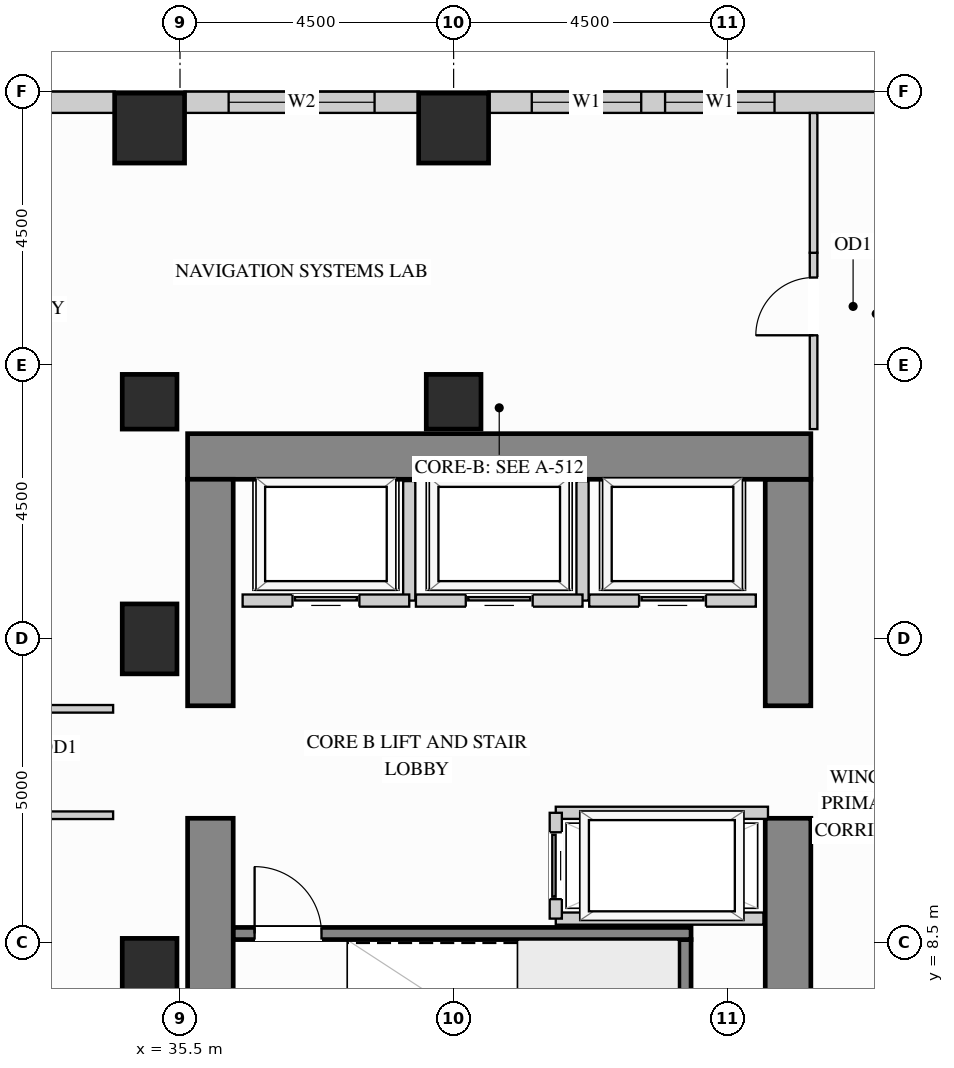
"""IFC4 building model, lengths in metres.
Left out: names, types, materials, properties, quantities, classifications, styles, units other than length and angle.
Written with IfcOpenShell. Run it as: python <this file> out.ifc"""

import sys

from ifc_helpers import new_model, si_unit, direction, frame, frame_2d, origin, origin_2d, place, context, subcontext, project, spatial, rectangle, extrude, source, transform, mapped, element, fill, save


model = new_model("IFC4")
c1 = context("Model", 3, precision=1e-05, world=origin(), true_north=direction((0.0, 1.0)))
c2 = subcontext(c1, "Body", "Model", "MODEL_VIEW")
j1 = project(units=[si_unit("LENGTHUNIT", "METRE"), si_unit("PLANEANGLEUNIT", "RADIAN")], contexts=[c1])
p1 = place(None, origin())
s1 = spatial("IfcSite", under=j1, at=p1, CompositionType="ELEMENT")
p2 = place(p1, origin())
s2 = spatial("IfcBuilding", under=s1, at=p2, CompositionType="ELEMENT")
p3 = place(p2, frame((0.0, 0.0, 77.4)))
s3 = spatial("IfcBuildingStorey", under=s2, at=p3, CompositionType="ELEMENT", Elevation=77.4)
m1 = source(origin(), c2, "Body", "SweptSolid", [
    extrude(rectangle(XDim=0.9, YDim=0.9, at=origin_2d()), origin(), (0.0, 0.0, 1.0), 3.38),
])
for number, where, z_axis, x_axis in (
    (1, (35.0, 17.4, 0.0), (0.0, 0.0, 1.0), (1.0, 0.0, 0.0)),
    (2, (40.0, 17.4, 0.0), (0.0, 0.0, 1.0), (1.0, 0.0, 0.0)),
):
    element("IfcColumn", number, at=place(p3, frame(where, z_axis=z_axis, x_axis=x_axis)), inside=s3, PredefinedType="COLUMN", context=c2, shape_type="MappedRepresentation", body=[
        mapped(m1, transform((0.0, 0.0, 0.0), x_axis=(1.0, 0.0, 0.0), y_axis=(0.0, 1.0, 0.0), z_axis=(0.0, 0.0, 1.0))),
    ])
m2 = source(origin(), c2, "Body", "SweptSolid", [
    extrude(rectangle(XDim=0.9, YDim=1.15, at=origin_2d()), origin(), (0.0, 0.0, 1.0), 3.38),
])
for number, where, z_axis, x_axis in (
    (3, (35.0, 13.5, 0.0), (0.0, 0.0, 1.0), (1.0, 0.0, 0.0)),
    (4, (35.0, 8.0, 0.0), (0.0, 0.0, 1.0), (1.0, 0.0, 0.0)),
):
    element("IfcColumn", number, at=place(p3, frame(where, z_axis=z_axis, x_axis=x_axis)), inside=s3, PredefinedType="COLUMN", context=c2, shape_type="MappedRepresentation", body=[
        mapped(m2, transform((0.0, 0.0, 0.0), x_axis=(1.0, 0.0, 0.0), y_axis=(0.0, 1.0, 0.0), z_axis=(0.0, 0.0, 1.0))),
    ])
m3 = source(origin(), c2, "Body", "SweptSolid", [
    extrude(rectangle(XDim=1.15, YDim=1.15, at=origin_2d()), origin(), (0.0, 0.0, 1.0), 3.38),
])
for number, where, z_axis, x_axis in (
    (5, (35.0, 21.9, 0.0), (0.0, 0.0, 1.0), (1.0, 0.0, 0.0)),
    (6, (40.0, 21.9, 0.0), (0.0, 0.0, 1.0), (1.0, 0.0, 0.0)),
):
    element("IfcColumn", number, at=place(p3, frame(where, z_axis=z_axis, x_axis=x_axis)), inside=s3, PredefinedType="COLUMN", context=c2, shape_type="MappedRepresentation", body=[
        mapped(m3, transform((0.0, 0.0, 0.0), x_axis=(1.0, 0.0, 0.0), y_axis=(0.0, 1.0, 0.0), z_axis=(0.0, 0.0, 1.0))),
    ])
m4 = source(origin(), c2, "Body", "SweptSolid", [
    extrude(rectangle(XDim=5.675, YDim=0.75, at=frame_2d((2.837, 0.0))), origin(), (0.0, 0.0, 1.0), 3.38),
])
p4 = place(p3, frame((45.5, 4.875, 0.0), z_axis=(0.0, 0.0, 1.0), x_axis=(0.0, 1.0, 0.0)))
e7 = element("IfcWall", 7, at=p4, inside=s3, PredefinedType="SHEAR", context=c2, shape_type="MappedRepresentation", body=[
    mapped(m4, transform((0.0, 0.0, 0.0), x_axis=(1.0, 0.0, 0.0), y_axis=(0.0, 1.0, 0.0), z_axis=(0.0, 0.0, 1.0))),
])
m5 = source(origin(), c2, "Body", "SweptSolid", [
    extrude(rectangle(XDim=3.725, YDim=0.75, at=frame_2d((1.863, 0.0))), origin(), (0.0, 0.0, 1.0), 3.38),
])
p5 = place(p3, frame((45.5, 12.4, 0.0), z_axis=(0.0, 0.0, 1.0), x_axis=(0.0, 1.0, 0.0)))
e8 = element("IfcWall", 8, at=p5, inside=s3, PredefinedType="SHEAR", context=c2, shape_type="MappedRepresentation", body=[
    mapped(m5, transform((0.0, 0.0, 0.0), x_axis=(1.0, 0.0, 0.0), y_axis=(0.0, 1.0, 0.0), z_axis=(0.0, 0.0, 1.0))),
])
m6 = source(origin(), c2, "Body", "SweptSolid", [
    extrude(rectangle(XDim=10.25, YDim=0.75, at=frame_2d((5.125, 0.0))), origin(), (0.0, 0.0, 1.0), 3.38),
])
p6 = place(p3, frame((35.625, 16.5, 0.0), z_axis=(0.0, 0.0, 1.0), x_axis=(1.0, 0.0, 0.0)))
e9 = element("IfcWall", 9, at=p6, inside=s3, PredefinedType="SHEAR", context=c2, shape_type="MappedRepresentation", body=[
    mapped(m6, transform((0.0, 0.0, 0.0), x_axis=(1.0, 0.0, 0.0), y_axis=(0.0, 1.0, 0.0), z_axis=(0.0, 0.0, 1.0))),
])
p7 = place(p3, frame((36.0, 4.875, 0.0), z_axis=(0.0, 0.0, 1.0), x_axis=(0.0, 1.0, 0.0)))
e10 = element("IfcWall", 10, at=p7, inside=s3, PredefinedType="SHEAR", context=c2, shape_type="MappedRepresentation", body=[
    mapped(m4, transform((0.0, 0.0, 0.0), x_axis=(1.0, 0.0, 0.0), y_axis=(0.0, 1.0, 0.0), z_axis=(0.0, 0.0, 1.0))),
])
p8 = place(p3, frame((36.0, 12.4, 0.0), z_axis=(0.0, 0.0, 1.0), x_axis=(0.0, 1.0, 0.0)))
e11 = element("IfcWall", 11, at=p8, inside=s3, PredefinedType="SHEAR", context=c2, shape_type="MappedRepresentation", body=[
    mapped(m5, transform((0.0, 0.0, 0.0), x_axis=(1.0, 0.0, 0.0), y_axis=(0.0, 1.0, 0.0), z_axis=(0.0, 0.0, 1.0))),
])
p9 = place(p3, frame((47.027, 22.325, 0.0), z_axis=(0.0, 0.0, 1.0), x_axis=(-1.0, 0.0, 0.0)))
e12 = element("IfcWall", 12, at=p9, inside=s3, PredefinedType="SOLIDWALL", context=c2, shape_type="SweptSolid", body=[
    extrude(rectangle(XDim=6.454, YDim=0.35, at=frame_2d((3.227, 0.0))), origin(), (0.0, 0.0, 1.0), 3.365),
])
p10 = place(p9, frame((1.749, 0.0, 0.78)))
e13 = element("IfcOpeningElement", 13, at=p10, cuts=e12, PredefinedType="OPENING", context=c2, shape_type="SweptSolid", body=[
    extrude(rectangle(XDim=1.8, YDim=2.1, at=frame_2d((0.9, 1.05))), frame((0.0, 0.185, 0.0), z_axis=(0.0, -1.0, 0.0), x_axis=(1.0, 0.0, 0.0)), (0.0, 0.0, 1.0), 0.37),
])
p11 = place(p9, frame((3.942, 0.0, 0.78)))
e14 = element("IfcOpeningElement", 14, at=p11, cuts=e12, PredefinedType="OPENING", context=c2, shape_type="SweptSolid", body=[
    extrude(rectangle(XDim=1.8, YDim=2.1, at=frame_2d((0.9, 1.05))), frame((0.0, 0.185, 0.0), z_axis=(0.0, -1.0, 0.0), x_axis=(1.0, 0.0, 0.0)), (0.0, 0.0, 1.0), 0.37),
])
p12 = place(p3, frame((39.427, 22.325, 0.0), z_axis=(0.0, 0.0, 1.0), x_axis=(-1.0, 0.0, 0.0)))
e15 = element("IfcWall", 15, at=p12, inside=s3, PredefinedType="SOLIDWALL", context=c2, shape_type="SweptSolid", body=[
    extrude(rectangle(XDim=3.854, YDim=0.35, at=frame_2d((1.927, 0.0))), origin(), (0.0, 0.0, 1.0), 3.365),
])
p13 = place(p12, frame((0.727, 0.0, 0.78)))
e16 = element("IfcOpeningElement", 16, at=p13, cuts=e15, PredefinedType="OPENING", context=c2, shape_type="SweptSolid", body=[
    extrude(rectangle(XDim=2.4, YDim=2.1, at=frame_2d((1.2, 1.05))), frame((0.0, 0.185, 0.0), z_axis=(0.0, -1.0, 0.0), x_axis=(1.0, 0.0, 0.0)), (0.0, 0.0, 1.0), 0.37),
])
p14 = place(p3, frame((34.427, 22.325, 0.0), z_axis=(0.0, 0.0, 1.0), x_axis=(-1.0, 0.0, 0.0)))
e17 = element("IfcWall", 17, at=p14, inside=s3, PredefinedType="SOLIDWALL", context=c2, shape_type="SweptSolid", body=[
    extrude(rectangle(XDim=14.979, YDim=0.35, at=frame_2d((7.49, 0.0))), origin(), (0.0, 0.0, 1.0), 3.365),
])
p15 = place(p14, frame((4.1, 0.0, 0.78)))
e18 = element("IfcOpeningElement", 18, at=p15, cuts=e17, PredefinedType="OPENING", context=c2, shape_type="SweptSolid", body=[
    extrude(rectangle(XDim=1.5, YDim=2.0, at=frame_2d((0.75, 1.0))), frame((0.0, 0.185, 0.0), z_axis=(0.0, -1.0, 0.0), x_axis=(1.0, 0.0, 0.0)), (0.0, 0.0, 1.0), 0.37),
])
p16 = place(p14, frame((9.379, 0.0, 0.78)))
e19 = element("IfcOpeningElement", 19, at=p16, cuts=e17, PredefinedType="OPENING", context=c2, shape_type="SweptSolid", body=[
    extrude(rectangle(XDim=1.5, YDim=2.0, at=frame_2d((0.75, 1.0))), frame((0.0, 0.185, 0.0), z_axis=(0.0, -1.0, 0.0), x_axis=(1.0, 0.0, 0.0)), (0.0, 0.0, 1.0), 0.37),
])
p17 = place(p3, frame((45.92, 16.95, 0.0), z_axis=(0.0, 0.0, 1.0), x_axis=(0.0, 1.0, 0.0)))
e20 = element("IfcWall", 20, at=p17, inside=s3, PredefinedType="PARTITIONING", context=c2, shape_type="SweptSolid", body=[
    extrude(rectangle(XDim=2.9, YDim=0.125, at=frame_2d((1.45, 0.0))), origin(), (0.0, 0.0, 1.0), 3.365),
])
p18 = place(p17, frame((1.543, 0.0, 0.0)))
e21 = element("IfcOpeningElement", 21, at=p18, cuts=e20, PredefinedType="OPENING", context=c2, shape_type="SweptSolid", body=[
    extrude(rectangle(XDim=0.95, YDim=2.15, at=frame_2d((0.475, 1.075))), frame((0.0, 0.073, 0.0), z_axis=(0.0, -1.0, 0.0), x_axis=(1.0, 0.0, 0.0)), (0.0, 0.0, 1.0), 0.145),
])
m7 = source(origin(), c2, "Body", "SweptSolid", [
    extrude(rectangle(XDim=2.298, YDim=0.125, at=frame_2d((1.149, 0.0))), origin(), (0.0, 0.0, 1.0), 3.365),
])
p19 = place(p3, frame((45.92, 19.85, 0.0), z_axis=(0.0, 0.0, 1.0), x_axis=(0.0, 1.0, 0.0)))
e22 = element("IfcWall", 22, at=p19, inside=s3, PredefinedType="PARTITIONING", context=c2, shape_type="MappedRepresentation", body=[
    mapped(m7, transform((0.0, 0.0, 0.0), x_axis=(1.0, 0.0, 0.0), y_axis=(0.0, 1.0, 0.0), z_axis=(0.0, 0.0, 1.0))),
])
p20 = place(p3, frame((29.85, 12.35, 0.0), z_axis=(0.0, 0.0, 1.0), x_axis=(1.0, 0.0, 0.0)))
e23 = element("IfcWall", 23, at=p20, inside=s3, PredefinedType="PARTITIONING", context=c2, shape_type="SweptSolid", body=[
    extrude(rectangle(XDim=4.55, YDim=0.125, at=frame_2d((2.275, 0.0))), origin(), (0.0, 0.0, 1.0), 3.365),
])
p21 = place(p20, frame((1.8, 0.0, 0.0)))
e24 = element("IfcOpeningElement", 24, at=p21, cuts=e23, PredefinedType="OPENING", context=c2, shape_type="SweptSolid", body=[
    extrude(rectangle(XDim=0.95, YDim=2.15, at=frame_2d((0.475, 1.075))), frame((0.0, 0.073, 0.0), z_axis=(0.0, -1.0, 0.0), x_axis=(1.0, 0.0, 0.0)), (0.0, 0.0, 1.0), 0.145),
])
p22 = place(p3, frame((26.95, 10.6, 0.0), z_axis=(0.0, 0.0, 1.0), x_axis=(1.0, 0.0, 0.0)))
e25 = element("IfcWall", 25, at=p22, inside=s3, PredefinedType="PARTITIONING", context=c2, shape_type="SweptSolid", body=[
    extrude(rectangle(XDim=7.45, YDim=0.125, at=frame_2d((3.725, 0.0))), origin(), (0.0, 0.0, 1.0), 3.365),
])
p23 = place(p22, frame((4.683, 0.0, 0.0)))
e26 = element("IfcOpeningElement", 26, at=p23, cuts=e25, PredefinedType="OPENING", context=c2, shape_type="SweptSolid", body=[
    extrude(rectangle(XDim=0.95, YDim=2.15, at=frame_2d((0.475, 1.075))), frame((0.0, 0.073, 0.0), z_axis=(0.0, -1.0, 0.0), x_axis=(1.0, 0.0, 0.0)), (0.0, 0.0, 1.0), 0.145),
])
m8 = source(origin(), c2, "Body", "SweptSolid", [
    extrude(rectangle(XDim=1.965, YDim=0.2, at=frame_2d((0.982, 0.0))), origin(), (0.0, 0.0, 1.0), 3.365),
])
p24 = place(p3, frame((39.27, 14.13, 0.0), z_axis=(0.0, 0.0, 1.0), x_axis=(0.0, 1.0, 0.0)))
e27 = element("IfcWall", 27, at=p24, inside=s3, PredefinedType="PARTITIONING", context=c2, shape_type="MappedRepresentation", body=[
    mapped(m8, transform((0.0, 0.0, 0.0), x_axis=(1.0, 0.0, 0.0), y_axis=(0.0, 1.0, 0.0), z_axis=(0.0, 0.0, 1.0))),
])
p25 = place(p3, frame((36.53, 14.13, 0.0), z_axis=(0.0, 0.0, 1.0), x_axis=(1.0, 0.0, 0.0)))
e28 = element("IfcWall", 28, at=p25, inside=s3, PredefinedType="PARTITIONING", context=c2, shape_type="SweptSolid", body=[
    extrude(rectangle(XDim=2.74, YDim=0.2, at=frame_2d((1.37, 0.0))), origin(), (0.0, 0.0, 1.0), 3.365),
])
p26 = place(p25, frame((0.82, 0.0, 0.0)))
e29 = element("IfcOpeningElement", 29, at=p26, cuts=e28, PredefinedType="OPENING", context=c2, shape_type="SweptSolid", body=[
    extrude(rectangle(XDim=1.1, YDim=2.2, at=frame_2d((0.55, 1.1))), frame((0.0, 0.11, 0.0), z_axis=(0.0, -1.0, 0.0), x_axis=(1.0, 0.0, 0.0)), (0.0, 0.0, 1.0), 0.22),
])
p27 = place(p3, frame((42.12, 14.13, 0.0), z_axis=(0.0, 0.0, 1.0), x_axis=(0.0, 1.0, 0.0)))
e30 = element("IfcWall", 30, at=p27, inside=s3, PredefinedType="PARTITIONING", context=c2, shape_type="MappedRepresentation", body=[
    mapped(m8, transform((0.0, 0.0, 0.0), x_axis=(1.0, 0.0, 0.0), y_axis=(0.0, 1.0, 0.0), z_axis=(0.0, 0.0, 1.0))),
])
p28 = place(p3, frame((39.38, 14.13, 0.0), z_axis=(0.0, 0.0, 1.0), x_axis=(1.0, 0.0, 0.0)))
e31 = element("IfcWall", 31, at=p28, inside=s3, PredefinedType="PARTITIONING", context=c2, shape_type="SweptSolid", body=[
    extrude(rectangle(XDim=2.74, YDim=0.2, at=frame_2d((1.37, 0.0))), origin(), (0.0, 0.0, 1.0), 3.365),
])
p29 = place(p28, frame((0.82, 0.0, 0.0)))
e32 = element("IfcOpeningElement", 32, at=p29, cuts=e31, PredefinedType="OPENING", context=c2, shape_type="SweptSolid", body=[
    extrude(rectangle(XDim=1.1, YDim=2.2, at=frame_2d((0.55, 1.1))), frame((0.0, 0.11, 0.0), z_axis=(0.0, -1.0, 0.0), x_axis=(1.0, 0.0, 0.0)), (0.0, 0.0, 1.0), 0.22),
])
p30 = place(p3, frame((42.23, 14.13, 0.0), z_axis=(0.0, 0.0, 1.0), x_axis=(1.0, 0.0, 0.0)))
e33 = element("IfcWall", 33, at=p30, inside=s3, PredefinedType="PARTITIONING", context=c2, shape_type="SweptSolid", body=[
    extrude(rectangle(XDim=2.74, YDim=0.2, at=frame_2d((1.37, 0.0))), origin(), (0.0, 0.0, 1.0), 3.365),
])
p31 = place(p30, frame((0.82, 0.0, 0.0)))
e34 = element("IfcOpeningElement", 34, at=p31, cuts=e33, PredefinedType="OPENING", context=c2, shape_type="SweptSolid", body=[
    extrude(rectangle(XDim=1.1, YDim=2.2, at=frame_2d((0.55, 1.1))), frame((0.0, 0.11, 0.0), z_axis=(0.0, -1.0, 0.0), x_axis=(1.0, 0.0, 0.0)), (0.0, 0.0, 1.0), 0.22),
])
m9 = source(origin(), c2, "Body", "SweptSolid", [
    extrude(rectangle(XDim=3.49, YDim=0.2, at=frame_2d((1.745, 0.0))), origin(), (0.0, 0.0, 1.0), 3.365),
])
p32 = place(p3, frame((41.68, 10.64, 0.0), z_axis=(0.0, 0.0, 1.0), x_axis=(1.0, 0.0, 0.0)))
e35 = element("IfcWall", 35, at=p32, inside=s3, PredefinedType="PARTITIONING", context=c2, shape_type="MappedRepresentation", body=[
    mapped(m9, transform((0.0, 0.0, 0.0), x_axis=(1.0, 0.0, 0.0), y_axis=(0.0, 1.0, 0.0), z_axis=(0.0, 0.0, 1.0))),
])
m10 = source(origin(), c2, "Body", "SweptSolid", [
    extrude(rectangle(XDim=3.415, YDim=0.2, at=frame_2d((1.708, 0.0))), origin(), (0.0, 0.0, 1.0), 3.365),
])
p33 = place(p3, frame((41.68, 8.9, 0.0), z_axis=(0.0, 0.0, 1.0), x_axis=(1.0, 0.0, 0.0)))
e36 = element("IfcWall", 36, at=p33, inside=s3, PredefinedType="PARTITIONING", context=c2, shape_type="MappedRepresentation", body=[
    mapped(m10, transform((0.0, 0.0, 0.0), x_axis=(1.0, 0.0, 0.0), y_axis=(0.0, 1.0, 0.0), z_axis=(0.0, 0.0, 1.0))),
])
p34 = place(p3, frame((41.68, 8.9, 0.0), z_axis=(0.0, 0.0, 1.0), x_axis=(0.0, 1.0, 0.0)))
e37 = element("IfcWall", 37, at=p34, inside=s3, PredefinedType="PARTITIONING", context=c2, shape_type="SweptSolid", body=[
    extrude(rectangle(XDim=1.74, YDim=0.2, at=frame_2d((0.87, 0.0))), origin(), (0.0, 0.0, 1.0), 3.365),
])
p35 = place(p34, frame((0.32, 0.0, 0.0)))
e38 = element("IfcOpeningElement", 38, at=p35, cuts=e37, PredefinedType="OPENING", context=c2, shape_type="SweptSolid", body=[
    extrude(rectangle(XDim=1.1, YDim=2.2, at=frame_2d((0.55, 1.1))), frame((0.0, 0.11, 0.0), z_axis=(0.0, -1.0, 0.0), x_axis=(1.0, 0.0, 0.0)), (0.0, 0.0, 1.0), 0.22),
])
m11 = source(origin(), c2, "Body", "SweptSolid", [
    extrude(rectangle(XDim=3.678, YDim=0.2, at=frame_2d((1.839, 0.0))), origin(), (0.0, 0.0, 1.0), 3.38),
])
p36 = place(p3, frame((43.805, 4.877, 0.0), z_axis=(0.0, 0.0, 1.0), x_axis=(0.0, 1.0, 0.0)))
e39 = element("IfcWall", 39, at=p36, inside=s3, PredefinedType="SHEAR", context=c2, shape_type="MappedRepresentation", body=[
    mapped(m11, transform((0.0, 0.0, 0.0), x_axis=(1.0, 0.0, 0.0), y_axis=(0.0, 1.0, 0.0), z_axis=(0.0, 0.0, 1.0))),
])
p37 = place(p3, frame((36.377, 8.655, 0.0), z_axis=(0.0, 0.0, 1.0), x_axis=(1.0, 0.0, 0.0)))
e40 = element("IfcWall", 40, at=p37, inside=s3, PredefinedType="SHEAR", context=c2, shape_type="SweptSolid", body=[
    extrude(rectangle(XDim=7.528, YDim=0.2, at=frame_2d((3.764, 0.0))), origin(), (0.0, 0.0, 1.0), 3.38),
])
p38 = place(p37, frame((0.35, 0.0, 0.0)))
e41 = element("IfcOpeningElement", 41, at=p38, cuts=e40, PredefinedType="OPENING", context=c2, shape_type="SweptSolid", body=[
    extrude(rectangle(XDim=1.1, YDim=2.15, at=frame_2d((0.55, 1.075))), frame((0.0, 0.11, 0.0), z_axis=(0.0, -1.0, 0.0), x_axis=(1.0, 0.0, 0.0)), (0.0, 0.0, 1.0), 0.22),
])
m12 = source(origin(), c2, "Body", "SweptSolid", [
    extrude(rectangle(XDim=1.1, YDim=2.2, at=frame_2d((0.55, 1.1))), frame((0.0, 0.025, 0.0), z_axis=(0.0, -1.0, 0.0), x_axis=(1.0, 0.0, 0.0)), (0.0, 0.0, 1.0), 0.05),
])
p39 = place(p26, origin())
e42 = element("IfcDoor", 42, at=p39, inside=s3, OperationType="SLIDING_TO_LEFT", PredefinedType="DOOR", context=c2, shape_type="MappedRepresentation", body=[
    mapped(m12, transform((0.0, 0.0, 0.0), x_axis=(1.0, 0.0, 0.0), y_axis=(0.0, 1.0, 0.0), z_axis=(0.0, 0.0, 1.0))),
])
fill(e29, e42)
p40 = place(p29, origin())
e43 = element("IfcDoor", 43, at=p40, inside=s3, OperationType="SLIDING_TO_LEFT", PredefinedType="DOOR", context=c2, shape_type="MappedRepresentation", body=[
    mapped(m12, transform((0.0, 0.0, 0.0), x_axis=(1.0, 0.0, 0.0), y_axis=(0.0, 1.0, 0.0), z_axis=(0.0, 0.0, 1.0))),
])
fill(e32, e43)
p41 = place(p31, origin())
e44 = element("IfcDoor", 44, at=p41, inside=s3, OperationType="SLIDING_TO_LEFT", PredefinedType="DOOR", context=c2, shape_type="MappedRepresentation", body=[
    mapped(m12, transform((0.0, 0.0, 0.0), x_axis=(1.0, 0.0, 0.0), y_axis=(0.0, 1.0, 0.0), z_axis=(0.0, 0.0, 1.0))),
])
fill(e34, e44)
p42 = place(p35, origin())
e45 = element("IfcDoor", 45, at=p42, inside=s3, OperationType="SLIDING_TO_LEFT", PredefinedType="DOOR", context=c2, shape_type="MappedRepresentation", body=[
    mapped(m12, transform((0.0, 0.0, 0.0), x_axis=(1.0, 0.0, 0.0), y_axis=(0.0, 1.0, 0.0), z_axis=(0.0, 0.0, 1.0))),
])
fill(e38, e45)
m13 = source(origin(), c2, "Body", "SweptSolid", [
    extrude(rectangle(XDim=0.95, YDim=2.15, at=frame_2d((0.475, 1.075))), frame((0.0, 0.025, 0.0), z_axis=(0.0, -1.0, 0.0), x_axis=(1.0, 0.0, 0.0)), (0.0, 0.0, 1.0), 0.05),
])
p43 = place(p18, origin())
e46 = element("IfcDoor", 46, at=p43, inside=s3, OperationType="SINGLE_SWING_LEFT", PredefinedType="DOOR", context=c2, shape_type="MappedRepresentation", body=[
    mapped(m13, transform((0.0, 0.0, 0.0), x_axis=(1.0, 0.0, 0.0), y_axis=(0.0, 1.0, 0.0), z_axis=(0.0, 0.0, 1.0))),
])
fill(e21, e46)
m14 = source(origin(), c2, "Body", "SweptSolid", [
    extrude(rectangle(XDim=1.1, YDim=2.15, at=frame_2d((0.55, 1.075))), frame((0.0, 0.025, 0.0), z_axis=(0.0, -1.0, 0.0), x_axis=(1.0, 0.0, 0.0)), (0.0, 0.0, 1.0), 0.05),
])
p44 = place(p38, origin())
e47 = element("IfcDoor", 47, at=p44, inside=s3, OperationType="SINGLE_SWING_LEFT", PredefinedType="DOOR", context=c2, shape_type="MappedRepresentation", body=[
    mapped(m14, transform((0.0, 0.0, 0.0), x_axis=(1.0, 0.0, 0.0), y_axis=(0.0, 1.0, 0.0), z_axis=(0.0, 0.0, 1.0))),
])
fill(e41, e47)
m15 = source(origin(), c2, "Body", "SweptSolid", [
    extrude(rectangle(XDim=1.8, YDim=2.1, at=frame_2d((0.9, 1.05))), frame((0.0, 0.03, 0.0), z_axis=(0.0, -1.0, 0.0), x_axis=(1.0, 0.0, 0.0)), (0.0, 0.0, 1.0), 0.06),
])
p45 = place(p10, origin())
e48 = element("IfcWindow", 48, at=p45, inside=s3, PartitioningType="SINGLE_PANEL", PredefinedType="WINDOW", context=c2, shape_type="MappedRepresentation", body=[
    mapped(m15, transform((0.0, 0.0, 0.0), x_axis=(1.0, 0.0, 0.0), y_axis=(0.0, 1.0, 0.0), z_axis=(0.0, 0.0, 1.0))),
])
fill(e13, e48)
p46 = place(p11, origin())
e49 = element("IfcWindow", 49, at=p46, inside=s3, PartitioningType="SINGLE_PANEL", PredefinedType="WINDOW", context=c2, shape_type="MappedRepresentation", body=[
    mapped(m15, transform((0.0, 0.0, 0.0), x_axis=(1.0, 0.0, 0.0), y_axis=(0.0, 1.0, 0.0), z_axis=(0.0, 0.0, 1.0))),
])
fill(e14, e49)
m16 = source(origin(), c2, "Body", "SweptSolid", [
    extrude(rectangle(XDim=2.4, YDim=2.1, at=frame_2d((1.2, 1.05))), frame((0.0, 0.03, 0.0), z_axis=(0.0, -1.0, 0.0), x_axis=(1.0, 0.0, 0.0)), (0.0, 0.0, 1.0), 0.06),
])
p47 = place(p13, origin())
e50 = element("IfcWindow", 50, at=p47, inside=s3, PartitioningType="SINGLE_PANEL", PredefinedType="WINDOW", context=c2, shape_type="MappedRepresentation", body=[
    mapped(m16, transform((0.0, 0.0, 0.0), x_axis=(1.0, 0.0, 0.0), y_axis=(0.0, 1.0, 0.0), z_axis=(0.0, 0.0, 1.0))),
])
fill(e16, e50)
save(model, sys.argv[1])
